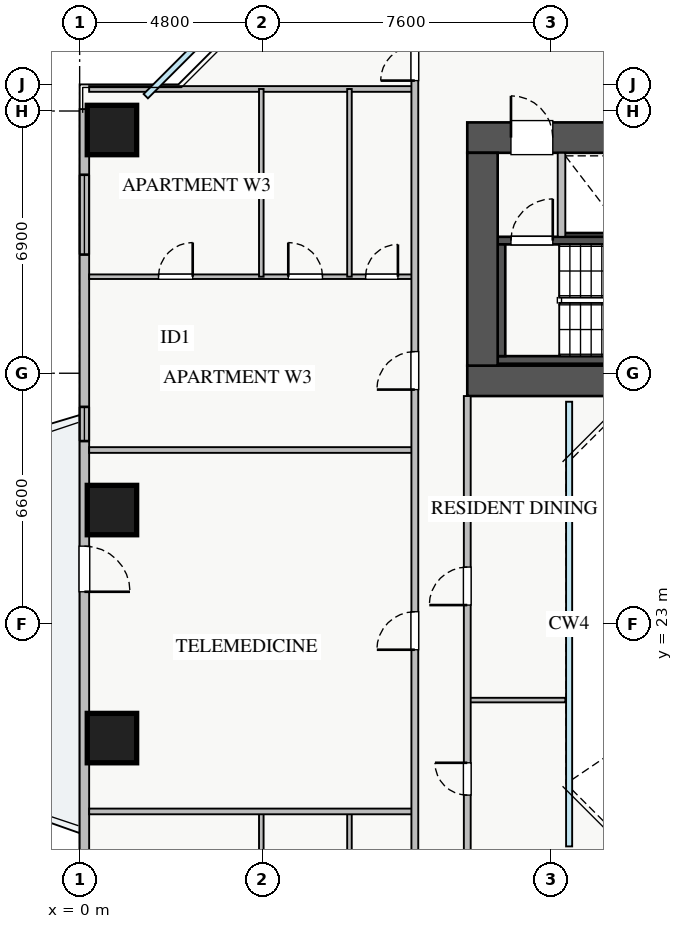
"""IFC4 building model, lengths in metres.
Left out: names, types, materials, properties, quantities, classifications, styles, units other than length and angle.
Written with IfcOpenShell. Run it as: python <this file> out.ifc"""

import sys

from ifc_helpers import new_model, si_unit, direction, frame, frame_2d, origin, origin_2d, place, context, subcontext, project, spatial, rectangle, extrude, source, transform, mapped, element, fill, save


model = new_model("IFC4")
c1 = context("Model", 3, precision=1e-05, world=origin(), true_north=direction((0.0, 1.0)))
c2 = subcontext(c1, "Body", "Model", "MODEL_VIEW")
j1 = project(units=[si_unit("LENGTHUNIT", "METRE"), si_unit("PLANEANGLEUNIT", "RADIAN")], contexts=[c1])
p1 = place(None, origin())
s1 = spatial("IfcSite", under=j1, at=p1, CompositionType="ELEMENT")
p2 = place(p1, origin())
s2 = spatial("IfcBuilding", under=s1, at=p2, CompositionType="ELEMENT")
p3 = place(p2, frame((0.0, 0.0, 53.5)))
s3 = spatial("IfcBuildingStorey", under=s2, at=p3, CompositionType="ELEMENT", Elevation=53.5)
p4 = place(p3, frame((12.68, 33.2, 0.0), z_axis=(0.0, 0.0, 1.0), x_axis=(1.0, 0.0, 0.0)))
e1 = element("IfcWall", 1, at=p4, inside=s3, PredefinedType="SHEAR", context=c2, shape_type="SweptSolid", body=[
    extrude(rectangle(XDim=1.94, YDim=0.18, at=frame_2d((0.97, 0.0))), origin(), (0.0, 0.0, 1.0), 3.07),
])
p5 = place(p3, frame((11.0, 29.95, 0.0), z_axis=(0.0, 0.0, 1.0), x_axis=(1.0, 0.0, 0.0)))
e2 = element("IfcWall", 2, at=p5, inside=s3, PredefinedType="SHEAR", context=c2, shape_type="SweptSolid", body=[
    extrude(rectangle(XDim=7.15, YDim=0.2, at=frame_2d((3.575, 0.0))), origin(), (0.0, 0.0, 1.0), 3.25),
])
p6 = place(p3, frame((11.0, 33.09, 0.0), z_axis=(0.0, 0.0, 1.0), x_axis=(1.0, 0.0, 0.0)))
e3 = element("IfcWall", 3, at=p6, inside=s3, PredefinedType="SHEAR", context=c2, shape_type="SweptSolid", body=[
    extrude(rectangle(XDim=7.15, YDim=0.2, at=frame_2d((3.575, 0.0))), origin(), (0.0, 0.0, 1.0), 3.25),
])
p7 = place(p6, frame((0.35, 0.0, 0.0)))
e4 = element("IfcOpeningElement", 4, at=p7, cuts=e3, PredefinedType="OPENING", context=c2, shape_type="SweptSolid", body=[
    extrude(rectangle(XDim=1.1, YDim=2.05, at=frame_2d((0.55, 1.025))), frame((0.0, 0.11, 0.0), z_axis=(0.0, -1.0, 0.0), x_axis=(1.0, 0.0, 0.0)), (0.0, 0.0, 1.0), 0.22),
])
p8 = place(p3, frame((11.1, 30.05, 0.0), z_axis=(0.0, 0.0, 1.0), x_axis=(0.0, 1.0, 0.0)))
e5 = element("IfcWall", 5, at=p8, inside=s3, PredefinedType="SHEAR", context=c2, shape_type="SweptSolid", body=[
    extrude(rectangle(XDim=2.94, YDim=0.2, at=frame_2d((1.47, 0.0))), origin(), (0.0, 0.0, 1.0), 3.25),
])
p9 = place(p3, frame((10.2, 29.4, 0.0), z_axis=(0.0, 0.0, 1.0), x_axis=(1.0, 0.0, 0.0)))
e6 = element("IfcWall", 6, at=p9, inside=s3, PredefinedType="SHEAR", context=c2, shape_type="SweptSolid", body=[
    extrude(rectangle(XDim=17.6, YDim=0.8, at=frame_2d((8.8, 0.0))), origin(), (0.0, 0.0, 1.0), 3.25),
])
p10 = place(p3, frame((10.2, 35.8, 0.0), z_axis=(0.0, 0.0, 1.0), x_axis=(1.0, 0.0, 0.0)))
e7 = element("IfcWall", 7, at=p10, inside=s3, PredefinedType="SHEAR", context=c2, shape_type="SweptSolid", body=[
    extrude(rectangle(XDim=17.6, YDim=0.8, at=frame_2d((8.8, 0.0))), origin(), (0.0, 0.0, 1.0), 3.25),
])
p11 = place(p10, frame((1.15, 0.0, 0.0)))
e8 = element("IfcOpeningElement", 8, at=p11, cuts=e7, PredefinedType="OPENING", context=c2, shape_type="SweptSolid", body=[
    extrude(rectangle(XDim=1.1, YDim=2.05, at=frame_2d((0.55, 1.025))), frame((0.0, 0.41, 0.0), z_axis=(0.0, -1.0, 0.0), x_axis=(1.0, 0.0, 0.0)), (0.0, 0.0, 1.0), 0.82),
])
p12 = place(p10, frame((8.3, 0.0, 0.0)))
e9 = element("IfcOpeningElement", 9, at=p12, cuts=e7, PredefinedType="OPENING", context=c2, shape_type="SweptSolid", body=[
    extrude(rectangle(XDim=1.1, YDim=2.05, at=frame_2d((0.55, 1.025))), frame((0.0, 0.41, 0.0), z_axis=(0.0, -1.0, 0.0), x_axis=(1.0, 0.0, 0.0)), (0.0, 0.0, 1.0), 0.82),
])
p13 = place(p10, frame((10.05, 0.0, 0.0)))
e10 = element("IfcOpeningElement", 10, at=p13, cuts=e7, PredefinedType="OPENING", context=c2, shape_type="SweptSolid", body=[
    extrude(rectangle(XDim=1.1, YDim=2.05, at=frame_2d((0.55, 1.025))), frame((0.0, 0.41, 0.0), z_axis=(0.0, -1.0, 0.0), x_axis=(1.0, 0.0, 0.0)), (0.0, 0.0, 1.0), 0.82),
])
p14 = place(p10, frame((14.74, 0.0, 0.0)))
e11 = element("IfcOpeningElement", 11, at=p14, cuts=e7, PredefinedType="OPENING", context=c2, shape_type="SweptSolid", body=[
    extrude(rectangle(XDim=1.0, YDim=2.05, at=frame_2d((0.5, 1.025))), frame((0.0, 0.41, 0.0), z_axis=(0.0, -1.0, 0.0), x_axis=(1.0, 0.0, 0.0)), (0.0, 0.0, 1.0), 0.82),
])
p15 = place(p10, frame((11.95, 0.0, 0.0)))
e12 = element("IfcOpeningElement", 12, at=p15, cuts=e7, PredefinedType="OPENING", context=c2, shape_type="SweptSolid", body=[
    extrude(rectangle(XDim=1.0, YDim=2.05, at=frame_2d((0.5, 1.025))), frame((0.0, 0.41, 0.0), z_axis=(0.0, -1.0, 0.0), x_axis=(1.0, 0.0, 0.0)), (0.0, 0.0, 1.0), 0.82),
])
p16 = place(p10, frame((13.485, 0.0, 0.0)))
e13 = element("IfcOpeningElement", 13, at=p16, cuts=e7, PredefinedType="OPENING", context=c2, shape_type="SweptSolid", body=[
    extrude(rectangle(XDim=1.0, YDim=2.05, at=frame_2d((0.5, 1.025))), frame((0.0, 0.41, 0.0), z_axis=(0.0, -1.0, 0.0), x_axis=(1.0, 0.0, 0.0)), (0.0, 0.0, 1.0), 0.82),
])
p17 = place(p3, frame((10.6, 29.8, 0.0), z_axis=(0.0, 0.0, 1.0), x_axis=(0.0, 1.0, 0.0)))
e14 = element("IfcWall", 14, at=p17, inside=s3, PredefinedType="SHEAR", context=c2, shape_type="SweptSolid", body=[
    extrude(rectangle(XDim=5.6, YDim=0.8, at=frame_2d((2.8, 0.0))), origin(), (0.0, 0.0, 1.0), 3.25),
])
m1 = source(origin(), c2, "Body", "SweptSolid", [
    extrude(rectangle(XDim=1.3, YDim=1.3, at=origin_2d()), origin(), (0.0, 0.0, 1.0), 3.25),
])
for number, where, z_axis, x_axis in (
    (15, (0.85, 36.0, 0.0), (0.0, 0.0, 1.0), (1.0, 0.0, 0.0)),
    (16, (0.85, 26.0, 0.0), (0.0, 0.0, 1.0), (1.0, 0.0, 0.0)),
    (17, (0.85, 20.0, 0.0), (0.0, 0.0, 1.0), (1.0, 0.0, 0.0)),
):
    element("IfcColumn", number, at=place(p3, frame(where, z_axis=z_axis, x_axis=x_axis)), inside=s3, PredefinedType="COLUMN", context=c2, shape_type="MappedRepresentation", body=[
        mapped(m1, transform((0.0, 0.0, 0.0), x_axis=(1.0, 0.0, 0.0), y_axis=(0.0, 1.0, 0.0), z_axis=(0.0, 0.0, 1.0), scale=1.0)),
    ])
p18 = place(p3, frame((0.125, 9.45, 0.0), z_axis=(0.0, 0.0, 1.0), x_axis=(0.0, 1.0, 0.0)))
e18 = element("IfcWall", 18, at=p18, inside=s3, PredefinedType="STANDARD", context=c2, shape_type="SweptSolid", body=[
    extrude(rectangle(XDim=27.1, YDim=0.25, at=frame_2d((13.55, 0.0))), origin(), (0.0, 0.0, 1.0), 2.61),
])
p19 = place(p18, frame((14.4, 0.0, 0.0)))
e19 = element("IfcOpeningElement", 19, at=p19, cuts=e18, PredefinedType="OPENING", context=c2, shape_type="SweptSolid", body=[
    extrude(rectangle(XDim=1.2, YDim=2.1, at=frame_2d((0.6, 1.05))), frame((0.0, 0.135, 0.0), z_axis=(0.0, -1.0, 0.0), x_axis=(1.0, 0.0, 0.0)), (0.0, 0.0, 1.0), 0.27),
])
p20 = place(p18, frame((1.512, 0.0, 0.9)))
e20 = element("IfcOpeningElement", 20, at=p20, cuts=e18, PredefinedType="OPENING", context=c2, shape_type="SweptSolid", body=[
    extrude(rectangle(XDim=1.8, YDim=1.5, at=frame_2d((0.9, 0.75))), frame((0.0, 0.135, 0.0), z_axis=(0.0, -1.0, 0.0), x_axis=(1.0, 0.0, 0.0)), (0.0, 0.0, 1.0), 0.27),
])
p21 = place(p18, frame((23.272, 0.0, 0.9)))
e21 = element("IfcOpeningElement", 21, at=p21, cuts=e18, PredefinedType="OPENING", context=c2, shape_type="SweptSolid", body=[
    extrude(rectangle(XDim=2.1, YDim=1.5, at=frame_2d((1.05, 0.75))), frame((0.0, 0.135, 0.0), z_axis=(0.0, -1.0, 0.0), x_axis=(1.0, 0.0, 0.0)), (0.0, 0.0, 1.0), 0.27),
])
p22 = place(p18, frame((4.942, 0.0, 0.9)))
e22 = element("IfcOpeningElement", 22, at=p22, cuts=e18, PredefinedType="OPENING", context=c2, shape_type="SweptSolid", body=[
    extrude(rectangle(XDim=2.4, YDim=1.5, at=frame_2d((1.2, 0.75))), frame((0.0, 0.135, 0.0), z_axis=(0.0, -1.0, 0.0), x_axis=(1.0, 0.0, 0.0)), (0.0, 0.0, 1.0), 0.27),
])
p23 = place(p18, frame((18.365, 0.0, 0.9)))
e23 = element("IfcOpeningElement", 23, at=p23, cuts=e18, PredefinedType="OPENING", context=c2, shape_type="SweptSolid", body=[
    extrude(rectangle(XDim=0.9, YDim=1.2, at=frame_2d((0.45, 0.6))), frame((0.0, 0.135, 0.0), z_axis=(0.0, -1.0, 0.0), x_axis=(1.0, 0.0, 0.0)), (0.0, 0.0, 1.0), 0.27),
])
p24 = place(p3, frame((12.68, 33.19, 0.0), z_axis=(0.0, 0.0, 1.0), x_axis=(0.0, 1.0, 0.0)))
e24 = element("IfcWall", 24, at=p24, inside=s3, PredefinedType="PARTITIONING", context=c2, shape_type="SweptSolid", body=[
    extrude(rectangle(XDim=2.21, YDim=0.2, at=frame_2d((1.105, 0.0))), origin(), (0.0, 0.0, 1.0), 3.07),
])
p25 = place(p3, frame((0.25, 37.08, 0.0), z_axis=(0.0, 0.0, 1.0), x_axis=(1.0, 0.0, 0.0)))
e25 = element("IfcWall", 25, at=p25, inside=s3, PredefinedType="PARTITIONING", context=c2, shape_type="SweptSolid", body=[
    extrude(rectangle(XDim=8.57, YDim=0.15, at=frame_2d((4.285, 0.0))), origin(), (0.0, 0.0, 1.0), 3.07),
])
for number, where, z_axis, x_axis in (
    (26, (4.78, 13.13, 0.0), (0.0, 0.0, 1.0), (0.0, 1.0, 0.0)),
    (27, (7.1, 13.13, 0.0), (0.0, 0.0, 1.0), (0.0, 1.0, 0.0)),
):
    element("IfcWall", number, at=place(p3, frame(where, z_axis=z_axis, x_axis=x_axis)), inside=s3, PredefinedType="PLUMBINGWALL", context=c2, shape_type="SweptSolid", body=[
        extrude(rectangle(XDim=4.94, YDim=0.12, at=frame_2d((2.47, 0.0))), origin(), (0.0, 0.0, 1.0), 3.07),
    ])
p26 = place(p3, frame((0.25, 18.07, 0.0), z_axis=(0.0, 0.0, 1.0), x_axis=(1.0, 0.0, 0.0)))
e28 = element("IfcWall", 28, at=p26, inside=s3, PredefinedType="PARTITIONING", context=c2, shape_type="SweptSolid", body=[
    extrude(rectangle(XDim=8.57, YDim=0.15, at=frame_2d((4.285, 0.0))), origin(), (0.0, 0.0, 1.0), 2.865),
])
p27 = place(p3, frame((0.25, 32.14, 0.0), z_axis=(0.0, 0.0, 1.0), x_axis=(1.0, 0.0, 0.0)))
e29 = element("IfcWall", 29, at=p27, inside=s3, PredefinedType="PLUMBINGWALL", context=c2, shape_type="SweptSolid", body=[
    extrude(rectangle(XDim=8.57, YDim=0.12, at=frame_2d((4.285, 0.0))), origin(), (0.0, 0.0, 1.0), 3.07),
])
p28 = place(p27, frame((1.825, 0.0, 0.0)))
e30 = element("IfcOpeningElement", 30, at=p28, cuts=e29, PredefinedType="OPENING", context=c2, shape_type="SweptSolid", body=[
    extrude(rectangle(XDim=0.9, YDim=2.05, at=frame_2d((0.45, 1.025))), frame((0.0, 0.07, 0.0), z_axis=(0.0, -1.0, 0.0), x_axis=(1.0, 0.0, 0.0)), (0.0, 0.0, 1.0), 0.14),
])
p29 = place(p27, frame((5.24, 0.0, 0.0)))
e31 = element("IfcOpeningElement", 31, at=p29, cuts=e29, PredefinedType="OPENING", context=c2, shape_type="SweptSolid", body=[
    extrude(rectangle(XDim=0.9, YDim=2.05, at=frame_2d((0.45, 1.025))), frame((0.0, 0.07, 0.0), z_axis=(0.0, -1.0, 0.0), x_axis=(1.0, 0.0, 0.0)), (0.0, 0.0, 1.0), 0.14),
])
p30 = place(p27, frame((7.275, 0.0, 0.0)))
e32 = element("IfcOpeningElement", 32, at=p30, cuts=e29, PredefinedType="OPENING", context=c2, shape_type="SweptSolid", body=[
    extrude(rectangle(XDim=0.85, YDim=2.05, at=frame_2d((0.425, 1.025))), frame((0.0, 0.07, 0.0), z_axis=(0.0, -1.0, 0.0), x_axis=(1.0, 0.0, 0.0)), (0.0, 0.0, 1.0), 0.14),
])
for number, where, z_axis, x_axis in (
    (33, (4.78, 32.14, 0.0), (0.0, 0.0, 1.0), (0.0, 1.0, 0.0)),
    (34, (7.1, 32.14, 0.0), (0.0, 0.0, 1.0), (0.0, 1.0, 0.0)),
):
    element("IfcWall", number, at=place(p3, frame(where, z_axis=z_axis, x_axis=x_axis)), inside=s3, PredefinedType="PLUMBINGWALL", context=c2, shape_type="SweptSolid", body=[
        extrude(rectangle(XDim=4.94, YDim=0.12, at=frame_2d((2.47, 0.0))), origin(), (0.0, 0.0, 1.0), 3.07),
    ])
p31 = place(p3, frame((0.25, 27.58, 0.0), z_axis=(0.0, 0.0, 1.0), x_axis=(1.0, 0.0, 0.0)))
e35 = element("IfcWall", 35, at=p31, inside=s3, PredefinedType="PARTITIONING", context=c2, shape_type="SweptSolid", body=[
    extrude(rectangle(XDim=8.57, YDim=0.15, at=frame_2d((4.285, 0.0))), origin(), (0.0, 0.0, 1.0), 3.07),
])
p32 = place(p3, frame((8.82, 7.21, 0.0), z_axis=(0.0, 0.0, 1.0), x_axis=(0.0, 1.0, 0.0)))
e36 = element("IfcWall", 36, at=p32, inside=s3, PredefinedType="PARTITIONING", context=c2, shape_type="SweptSolid", body=[
    extrude(rectangle(XDim=31.23, YDim=0.18, at=frame_2d((15.615, 0.0))), origin(), (0.0, 0.0, 1.0), 3.07),
])
p33 = place(p32, frame((30.09, 0.0, 0.0)))
e37 = element("IfcOpeningElement", 37, at=p33, cuts=e36, PredefinedType="OPENING", context=c2, shape_type="SweptSolid", body=[
    extrude(rectangle(XDim=0.9, YDim=2.05, at=frame_2d((0.45, 1.025))), frame((0.0, 0.1, 0.0), z_axis=(0.0, -1.0, 0.0), x_axis=(1.0, 0.0, 0.0)), (0.0, 0.0, 1.0), 0.2),
])
p34 = place(p32, frame((0.24, 0.0, 0.0)))
e38 = element("IfcOpeningElement", 38, at=p34, cuts=e36, PredefinedType="OPENING", context=c2, shape_type="SweptSolid", body=[
    extrude(rectangle(XDim=0.9, YDim=2.05, at=frame_2d((0.45, 1.025))), frame((0.0, 0.1, 0.0), z_axis=(0.0, -1.0, 0.0), x_axis=(1.0, 0.0, 0.0)), (0.0, 0.0, 1.0), 0.2),
])
p35 = place(p32, frame((2.95, 0.0, 0.0)))
e39 = element("IfcOpeningElement", 39, at=p35, cuts=e36, PredefinedType="OPENING", context=c2, shape_type="SweptSolid", body=[
    extrude(rectangle(XDim=1.0, YDim=2.05, at=frame_2d((0.5, 1.025))), frame((0.0, 0.1, 0.0), z_axis=(0.0, -1.0, 0.0), x_axis=(1.0, 0.0, 0.0)), (0.0, 0.0, 1.0), 0.2),
])
p36 = place(p32, frame((15.115, 0.0, 0.0)))
e40 = element("IfcOpeningElement", 40, at=p36, cuts=e36, PredefinedType="OPENING", context=c2, shape_type="SweptSolid", body=[
    extrude(rectangle(XDim=1.0, YDim=2.05, at=frame_2d((0.5, 1.025))), frame((0.0, 0.1, 0.0), z_axis=(0.0, -1.0, 0.0), x_axis=(1.0, 0.0, 0.0)), (0.0, 0.0, 1.0), 0.2),
])
p37 = place(p32, frame((21.96, 0.0, 0.0)))
e41 = element("IfcOpeningElement", 41, at=p37, cuts=e36, PredefinedType="OPENING", context=c2, shape_type="SweptSolid", body=[
    extrude(rectangle(XDim=1.0, YDim=2.05, at=frame_2d((0.5, 1.025))), frame((0.0, 0.1, 0.0), z_axis=(0.0, -1.0, 0.0), x_axis=(1.0, 0.0, 0.0)), (0.0, 0.0, 1.0), 0.2),
])
p38 = place(p3, frame((10.2, 21.0, 0.0), z_axis=(0.0, 0.0, 1.0), x_axis=(1.0, 0.0, 0.0)))
e42 = element("IfcWall", 42, at=p38, inside=s3, PredefinedType="PLUMBINGWALL", context=c2, shape_type="SweptSolid", body=[
    extrude(rectangle(XDim=2.58, YDim=0.12, at=frame_2d((1.29, 0.0))), origin(), (0.0, 0.0, 1.0), 3.07),
])
p39 = place(p3, frame((10.2, 17.0, 0.0), z_axis=(0.0, 0.0, 1.0), x_axis=(0.0, 1.0, 0.0)))
e43 = element("IfcWall", 43, at=p39, inside=s3, PredefinedType="PARTITIONING", context=c2, shape_type="SweptSolid", body=[
    extrude(rectangle(XDim=12.0, YDim=0.18, at=frame_2d((6.0, 0.0))), origin(), (0.0, 0.0, 1.0), 3.07),
])
p40 = place(p39, frame((1.5, 0.0, 0.0)))
e44 = element("IfcOpeningElement", 44, at=p40, cuts=e43, PredefinedType="OPENING", context=c2, shape_type="SweptSolid", body=[
    extrude(rectangle(XDim=0.85, YDim=2.05, at=frame_2d((0.425, 1.025))), frame((0.0, 0.1, 0.0), z_axis=(0.0, -1.0, 0.0), x_axis=(1.0, 0.0, 0.0)), (0.0, 0.0, 1.0), 0.2),
])
p41 = place(p39, frame((6.5, 0.0, 0.0)))
e45 = element("IfcOpeningElement", 45, at=p41, cuts=e43, PredefinedType="OPENING", context=c2, shape_type="SweptSolid", body=[
    extrude(rectangle(XDim=1.0, YDim=2.05, at=frame_2d((0.5, 1.025))), frame((0.0, 0.1, 0.0), z_axis=(0.0, -1.0, 0.0), x_axis=(1.0, 0.0, 0.0)), (0.0, 0.0, 1.0), 0.2),
])
m2 = source(origin(), c2, "Body", "SweptSolid", [
    extrude(rectangle(XDim=1.2, YDim=2.1, at=frame_2d((0.6, 1.05))), frame((0.0, 0.025, 0.0), z_axis=(0.0, -1.0, 0.0), x_axis=(1.0, 0.0, 0.0)), (0.0, 0.0, 1.0), 0.05),
])
p42 = place(p19, frame((1.2, 0.0, 0.0), z_axis=(0.0, 0.0, 1.0), x_axis=(-1.0, 0.0, 0.0)))
e46 = element("IfcDoor", 46, at=p42, inside=s3, OperationType="SINGLE_SWING_LEFT", PredefinedType="DOOR", context=c2, shape_type="MappedRepresentation", body=[
    mapped(m2, transform((0.0, 0.0, 0.0), x_axis=(1.0, 0.0, 0.0), y_axis=(0.0, 1.0, 0.0), z_axis=(0.0, 0.0, 1.0), scale=1.0)),
])
fill(e19, e46)
m3 = source(origin(), c2, "Body", "SweptSolid", [
    extrude(rectangle(XDim=2.1, YDim=1.5, at=frame_2d((1.05, 0.75))), frame((0.0, 0.03, 0.0), z_axis=(0.0, -1.0, 0.0), x_axis=(1.0, 0.0, 0.0)), (0.0, 0.0, 1.0), 0.06),
])
p43 = place(p21, origin())
e47 = element("IfcWindow", 47, at=p43, inside=s3, PartitioningType="TRIPLE_PANEL_VERTICAL", PredefinedType="WINDOW", context=c2, shape_type="MappedRepresentation", body=[
    mapped(m3, transform((0.0, 0.0, 0.0), x_axis=(1.0, 0.0, 0.0), y_axis=(0.0, 1.0, 0.0), z_axis=(0.0, 0.0, 1.0), scale=1.0)),
])
fill(e21, e47)
m4 = source(origin(), c2, "Body", "SweptSolid", [
    extrude(rectangle(XDim=1.1, YDim=2.05, at=frame_2d((0.55, 1.025))), frame((0.0, 0.025, 0.0), z_axis=(0.0, -1.0, 0.0), x_axis=(1.0, 0.0, 0.0)), (0.0, 0.0, 1.0), 0.05),
])
p44 = place(p11, origin())
e48 = element("IfcDoor", 48, at=p44, inside=s3, OperationType="SINGLE_SWING_LEFT", PredefinedType="DOOR", context=c2, shape_type="MappedRepresentation", body=[
    mapped(m4, transform((0.0, 0.0, 0.0), x_axis=(1.0, 0.0, 0.0), y_axis=(0.0, 1.0, 0.0), z_axis=(0.0, 0.0, 1.0), scale=1.0)),
])
fill(e8, e48)
p45 = place(p7, origin())
e49 = element("IfcDoor", 49, at=p45, inside=s3, OperationType="SINGLE_SWING_RIGHT", PredefinedType="DOOR", context=c2, shape_type="MappedRepresentation", body=[
    mapped(m4, transform((0.0, 0.0, 0.0), x_axis=(1.0, 0.0, 0.0), y_axis=(0.0, 1.0, 0.0), z_axis=(0.0, 0.0, 1.0), scale=1.0)),
])
fill(e4, e49)
m5 = source(origin(), c2, "Body", "SweptSolid", [
    extrude(rectangle(XDim=0.9, YDim=2.05, at=frame_2d((0.45, 1.025))), frame((0.0, 0.025, 0.0), z_axis=(0.0, -1.0, 0.0), x_axis=(1.0, 0.0, 0.0)), (0.0, 0.0, 1.0), 0.05),
])
p46 = place(p28, origin())
e50 = element("IfcDoor", 50, at=p46, inside=s3, OperationType="SINGLE_SWING_RIGHT", PredefinedType="DOOR", context=c2, shape_type="MappedRepresentation", body=[
    mapped(m5, transform((0.0, 0.0, 0.0), x_axis=(1.0, 0.0, 0.0), y_axis=(0.0, 1.0, 0.0), z_axis=(0.0, 0.0, 1.0), scale=1.0)),
])
fill(e30, e50)
p47 = place(p29, origin())
e51 = element("IfcDoor", 51, at=p47, inside=s3, OperationType="SINGLE_SWING_LEFT", PredefinedType="DOOR", context=c2, shape_type="MappedRepresentation", body=[
    mapped(m5, transform((0.0, 0.0, 0.0), x_axis=(1.0, 0.0, 0.0), y_axis=(0.0, 1.0, 0.0), z_axis=(0.0, 0.0, 1.0), scale=1.0)),
])
fill(e31, e51)
m6 = source(origin(), c2, "Body", "SweptSolid", [
    extrude(rectangle(XDim=0.85, YDim=2.05, at=frame_2d((0.425, 1.025))), frame((0.0, 0.025, 0.0), z_axis=(0.0, -1.0, 0.0), x_axis=(1.0, 0.0, 0.0)), (0.0, 0.0, 1.0), 0.05),
])
p48 = place(p30, origin())
e52 = element("IfcDoor", 52, at=p48, inside=s3, OperationType="SINGLE_SWING_RIGHT", PredefinedType="DOOR", context=c2, shape_type="MappedRepresentation", body=[
    mapped(m6, transform((0.0, 0.0, 0.0), x_axis=(1.0, 0.0, 0.0), y_axis=(0.0, 1.0, 0.0), z_axis=(0.0, 0.0, 1.0), scale=1.0)),
])
fill(e32, e52)
p49 = place(p33, origin())
e53 = element("IfcDoor", 53, at=p49, inside=s3, OperationType="SINGLE_SWING_LEFT", PredefinedType="DOOR", context=c2, shape_type="MappedRepresentation", body=[
    mapped(m5, transform((0.0, 0.0, 0.0), x_axis=(1.0, 0.0, 0.0), y_axis=(0.0, 1.0, 0.0), z_axis=(0.0, 0.0, 1.0), scale=1.0)),
])
fill(e37, e53)
m7 = source(origin(), c2, "Body", "SweptSolid", [
    extrude(rectangle(XDim=1.0, YDim=2.05, at=frame_2d((0.5, 1.025))), frame((0.0, 0.025, 0.0), z_axis=(0.0, -1.0, 0.0), x_axis=(1.0, 0.0, 0.0)), (0.0, 0.0, 1.0), 0.05),
])
p50 = place(p36, origin())
e54 = element("IfcDoor", 54, at=p50, inside=s3, OperationType="SINGLE_SWING_LEFT", PredefinedType="DOOR", context=c2, shape_type="MappedRepresentation", body=[
    mapped(m7, transform((0.0, 0.0, 0.0), x_axis=(1.0, 0.0, 0.0), y_axis=(0.0, 1.0, 0.0), z_axis=(0.0, 0.0, 1.0), scale=1.0)),
])
fill(e40, e54)
p51 = place(p37, origin())
e55 = element("IfcDoor", 55, at=p51, inside=s3, OperationType="SINGLE_SWING_LEFT", PredefinedType="DOOR", context=c2, shape_type="MappedRepresentation", body=[
    mapped(m7, transform((0.0, 0.0, 0.0), x_axis=(1.0, 0.0, 0.0), y_axis=(0.0, 1.0, 0.0), z_axis=(0.0, 0.0, 1.0), scale=1.0)),
])
fill(e41, e55)
p52 = place(p40, origin())
e56 = element("IfcDoor", 56, at=p52, inside=s3, OperationType="SINGLE_SWING_RIGHT", PredefinedType="DOOR", context=c2, shape_type="MappedRepresentation", body=[
    mapped(m6, transform((0.0, 0.0, 0.0), x_axis=(1.0, 0.0, 0.0), y_axis=(0.0, 1.0, 0.0), z_axis=(0.0, 0.0, 1.0), scale=1.0)),
])
fill(e44, e56)
p53 = place(p41, origin())
e57 = element("IfcDoor", 57, at=p53, inside=s3, OperationType="SINGLE_SWING_LEFT", PredefinedType="DOOR", context=c2, shape_type="MappedRepresentation", body=[
    mapped(m7, transform((0.0, 0.0, 0.0), x_axis=(1.0, 0.0, 0.0), y_axis=(0.0, 1.0, 0.0), z_axis=(0.0, 0.0, 1.0), scale=1.0)),
])
fill(e45, e57)
m8 = source(origin(), c2, "Body", "SweptSolid", [
    extrude(rectangle(XDim=0.9, YDim=1.2, at=frame_2d((0.45, 0.6))), frame((0.0, 0.03, 0.0), z_axis=(0.0, -1.0, 0.0), x_axis=(1.0, 0.0, 0.0)), (0.0, 0.0, 1.0), 0.06),
])
p54 = place(p23, origin())
e58 = element("IfcWindow", 58, at=p54, inside=s3, PartitioningType="SINGLE_PANEL", PredefinedType="WINDOW", context=c2, shape_type="MappedRepresentation", body=[
    mapped(m8, transform((0.0, 0.0, 0.0), x_axis=(1.0, 0.0, 0.0), y_axis=(0.0, 1.0, 0.0), z_axis=(0.0, 0.0, 1.0), scale=1.0)),
])
fill(e23, e58)
save(model, sys.argv[1])
